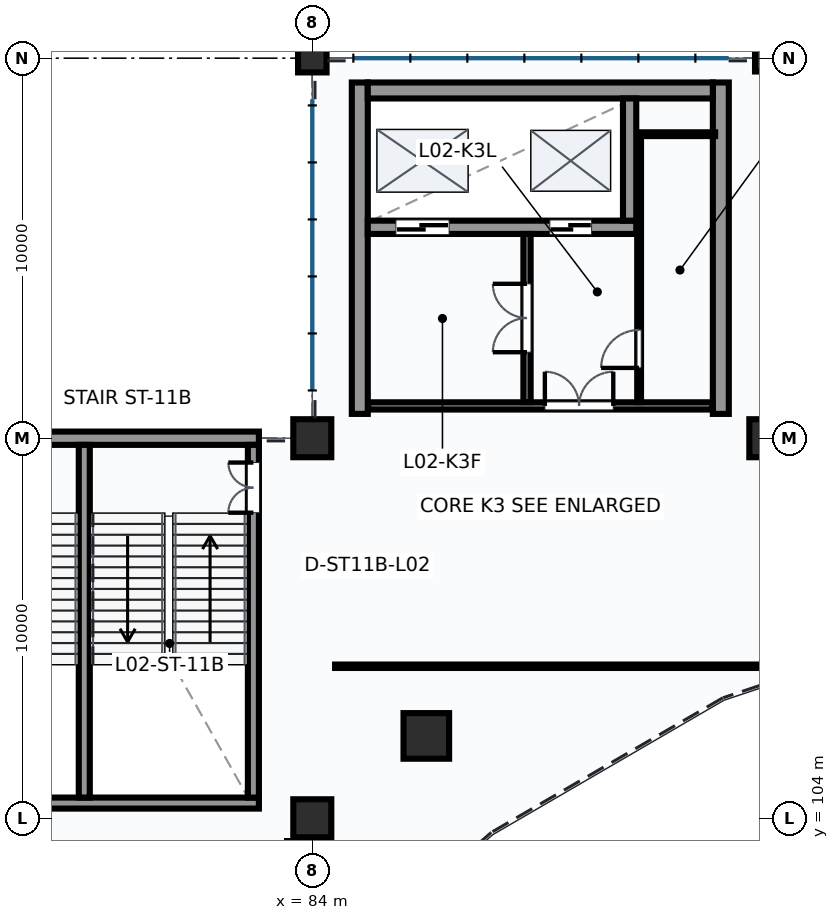
"""IFC4 building model, lengths in metres.
Left out: names, types, materials, properties, quantities, classifications, styles, units other than length and angle.
Written with IfcOpenShell. Run it as: python <this file> out.ifc"""

import sys

from ifc_helpers import new_model, si_unit, direction, frame, frame_2d, origin, origin_2d, place, context, subcontext, project, spatial, rectangle, extrude, element, fill, save


model = new_model("IFC4")
c1 = context("Model", 3, precision=1e-05, world=origin(), true_north=direction((0.0, 1.0)))
c2 = subcontext(c1, "Body", "Model", "MODEL_VIEW")
j1 = project(units=[si_unit("LENGTHUNIT", "METRE"), si_unit("PLANEANGLEUNIT", "RADIAN")], contexts=[c1])
p1 = place(None, origin())
s1 = spatial("IfcSite", under=j1, at=p1, CompositionType="ELEMENT")
p2 = place(p1, origin())
s2 = spatial("IfcBuilding", under=s1, at=p2, CompositionType="ELEMENT")
p3 = place(p2, frame((0.0, 0.0, 10.2)))
s3 = spatial("IfcBuildingStorey", under=s2, at=p3, CompositionType="ELEMENT", Elevation=10.2)
for number, where, z_axis, x_axis in (
    (1, (84.0, 104.0, 0.0), (0.0, 0.0, 1.0), (1.0, 0.0, 0.0)),
    (2, (84.0, 114.0, 0.0), (0.0, 0.0, 1.0), (1.0, 0.0, 0.0)),
):
    element("IfcColumn", number, at=place(p3, frame(where, z_axis=z_axis, x_axis=x_axis)), inside=s3, PredefinedType="COLUMN", context=c2, shape_type="SweptSolid", body=[
        extrude(rectangle(XDim=1.0, YDim=1.0, at=origin_2d()), origin(), (0.0, 0.0, 1.0), 4.5),
    ])
p4 = place(p3, frame((84.0, 124.0, 0.0), z_axis=(0.0, 0.0, 1.0), x_axis=(1.0, 0.0, 0.0)))
e3 = element("IfcColumn", 3, at=p4, inside=s3, PredefinedType="COLUMN", context=c2, shape_type="SweptSolid", body=[
    extrude(rectangle(XDim=0.75, YDim=0.75, at=origin_2d()), origin(), (0.0, 0.0, 1.0), 4.5),
])
p5 = place(p3, frame((96.0, 114.0, 0.0), z_axis=(0.0, 0.0, 1.0), x_axis=(1.0, 0.0, 0.0)))
e4 = element("IfcColumn", 4, at=p5, inside=s3, PredefinedType="COLUMN", context=c2, shape_type="SweptSolid", body=[
    extrude(rectangle(XDim=1.0, YDim=1.0, at=origin_2d()), origin(), (0.0, 0.0, 1.0), 4.5),
])
p6 = place(p3, frame((96.0, 124.0, 0.0), z_axis=(0.0, 0.0, 1.0), x_axis=(1.0, 0.0, 0.0)))
e5 = element("IfcColumn", 5, at=p6, inside=s3, PredefinedType="COLUMN", context=c2, shape_type="SweptSolid", body=[
    extrude(rectangle(XDim=0.7, YDim=0.7, at=origin_2d()), origin(), (0.0, 0.0, 1.0), 4.5),
])
p7 = place(p3, frame((87.0, 106.167, 0.0), z_axis=(0.0, 0.0, 1.0), x_axis=(1.0, 0.0, 0.0)))
e6 = element("IfcColumn", 6, at=p7, inside=s3, PredefinedType="COLUMN", context=c2, shape_type="SweptSolid", body=[
    extrude(rectangle(XDim=1.2, YDim=1.2, at=origin_2d()), origin(), (0.0, 0.0, 1.0), 4.5),
])
p8 = place(p3, frame((73.405, 104.4, 0.0), z_axis=(0.0, 0.0, 1.0), x_axis=(1.0, 0.0, 0.0)))
e7 = element("IfcWall", 7, at=p8, inside=s3, PredefinedType="SHEAR", context=c2, shape_type="SweptSolid", body=[
    extrude(rectangle(XDim=9.19, YDim=0.29, at=frame_2d((4.595, 0.0))), origin(), (0.0, 0.0, 1.0), 4.5),
])
p9 = place(p3, frame((73.405, 114.0, 0.0), z_axis=(0.0, 0.0, 1.0), x_axis=(1.0, 0.0, 0.0)))
e8 = element("IfcWall", 8, at=p9, inside=s3, PredefinedType="SHEAR", context=c2, shape_type="SweptSolid", body=[
    extrude(rectangle(XDim=9.19, YDim=0.35, at=frame_2d((4.595, 0.0))), origin(), (0.0, 0.0, 1.0), 3.664),
])
p10 = place(p3, frame((82.45, 104.545, 0.0), z_axis=(0.0, 0.0, 1.0), x_axis=(0.0, 1.0, 0.0)))
e9 = element("IfcWall", 9, at=p10, inside=s3, PredefinedType="SHEAR", context=c2, shape_type="SweptSolid", body=[
    extrude(rectangle(XDim=9.28, YDim=0.29, at=frame_2d((4.64, 0.0))), origin(), (0.0, 0.0, 1.0), 4.5),
])
p11 = place(p10, frame((7.495, 0.0, 0.0)))
e10 = element("IfcOpeningElement", 10, at=p11, cuts=e9, PredefinedType="OPENING", context=c2, shape_type="SweptSolid", body=[
    extrude(rectangle(XDim=1.32, YDim=2.2, at=frame_2d((0.66, 1.1))), frame((0.0, 0.155, 0.0), z_axis=(0.0, -1.0, 0.0), x_axis=(1.0, 0.0, 0.0)), (0.0, 0.0, 1.0), 0.31),
])
p12 = place(p3, frame((78.0, 104.545, 0.0), z_axis=(0.0, 0.0, 1.0), x_axis=(0.0, 1.0, 0.0)))
e11 = element("IfcWall", 11, at=p12, inside=s3, PredefinedType="SHEAR", context=c2, shape_type="SweptSolid", body=[
    extrude(rectangle(XDim=9.28, YDim=0.29, at=frame_2d((4.64, 0.0))), origin(), (0.0, 0.0, 1.0), 4.5),
])
for number, where, z_axis, x_axis in (
    (12, (85.25, 114.64, 0.0), (0.0, 0.0, 1.0), (0.0, 1.0, 0.0)),
    (13, (94.75, 114.64, 0.0), (0.0, 0.0, 1.0), (0.0, 1.0, 0.0)),
):
    element("IfcWall", number, at=place(p3, frame(where, z_axis=z_axis, x_axis=x_axis)), inside=s3, PredefinedType="SHEAR", context=c2, shape_type="SweptSolid", body=[
        extrude(rectangle(XDim=8.72, YDim=0.42, at=frame_2d((4.36, 0.0))), origin(), (0.0, 0.0, 1.0), 4.5),
    ])
p13 = place(p3, frame((85.46, 123.15, 0.0), z_axis=(0.0, 0.0, 1.0), x_axis=(1.0, 0.0, 0.0)))
e14 = element("IfcWall", 14, at=p13, inside=s3, PredefinedType="SHEAR", context=c2, shape_type="SweptSolid", body=[
    extrude(rectangle(XDim=9.08, YDim=0.42, at=frame_2d((4.54, 0.0))), origin(), (0.0, 0.0, 1.0), 4.5),
])
p14 = place(p3, frame((85.46, 119.55, 0.0), z_axis=(0.0, 0.0, 1.0), x_axis=(1.0, 0.0, 0.0)))
e15 = element("IfcWall", 15, at=p14, inside=s3, PredefinedType="SHEAR", context=c2, shape_type="SweptSolid", body=[
    extrude(rectangle(XDim=7.065, YDim=0.35, at=frame_2d((3.532, 0.0))), origin(), (0.0, 0.0, 1.0), 4.5),
])
p15 = place(p14, frame((0.74, 0.0, 0.0)))
e16 = element("IfcOpeningElement", 16, at=p15, cuts=e15, PredefinedType="OPENING", context=c2, shape_type="SweptSolid", body=[
    extrude(rectangle(XDim=1.4, YDim=2.3, at=frame_2d((0.7, 1.15))), frame((0.0, 0.185, 0.0), z_axis=(0.0, -1.0, 0.0), x_axis=(1.0, 0.0, 0.0)), (0.0, 0.0, 1.0), 0.37),
])
p16 = place(p14, frame((4.79, 0.0, 0.0)))
e17 = element("IfcOpeningElement", 17, at=p16, cuts=e15, PredefinedType="OPENING", context=c2, shape_type="SweptSolid", body=[
    extrude(rectangle(XDim=1.1, YDim=2.2, at=frame_2d((0.55, 1.1))), frame((0.0, 0.185, 0.0), z_axis=(0.0, -1.0, 0.0), x_axis=(1.0, 0.0, 0.0)), (0.0, 0.0, 1.0), 0.37),
])
p17 = place(p3, frame((92.35, 119.725, 0.0), z_axis=(0.0, 0.0, 1.0), x_axis=(0.0, 1.0, 0.0)))
e18 = element("IfcWall", 18, at=p17, inside=s3, PredefinedType="SHEAR", context=c2, shape_type="SweptSolid", body=[
    extrude(rectangle(XDim=3.215, YDim=0.35, at=frame_2d((1.607, 0.0))), origin(), (0.0, 0.0, 1.0), 4.5),
])
p18 = place(p3, frame((85.47, 114.85, 0.0), z_axis=(0.0, 0.0, 1.0), x_axis=(1.0, 0.0, 0.0)))
e19 = element("IfcWall", 19, at=p18, inside=s3, PredefinedType="PARTITIONING", context=c2, shape_type="SweptSolid", body=[
    extrude(rectangle(XDim=9.06, YDim=0.19, at=frame_2d((4.53, 0.0))), origin(), (0.0, 0.0, 1.0), 4.15),
])
p19 = place(p18, frame((4.65, 0.0, 0.0)))
e20 = element("IfcOpeningElement", 20, at=p19, cuts=e19, PredefinedType="OPENING", context=c2, shape_type="SweptSolid", body=[
    extrude(rectangle(XDim=1.8, YDim=2.3, at=frame_2d((0.9, 1.15))), frame((0.0, 0.105, 0.0), z_axis=(0.0, -1.0, 0.0), x_axis=(1.0, 0.0, 0.0)), (0.0, 0.0, 1.0), 0.21),
])
p20 = place(p3, frame((89.65, 114.95, 0.0), z_axis=(0.0, 0.0, 1.0), x_axis=(0.0, 1.0, 0.0)))
e21 = element("IfcWall", 21, at=p20, inside=s3, PredefinedType="PARTITIONING", context=c2, shape_type="SweptSolid", body=[
    extrude(rectangle(XDim=4.425, YDim=0.19, at=frame_2d((2.212, 0.0))), origin(), (0.0, 0.0, 1.0), 4.15),
])
p21 = place(p20, frame((1.313, 0.0, 0.0)))
e22 = element("IfcOpeningElement", 22, at=p21, cuts=e21, PredefinedType="OPENING", context=c2, shape_type="SweptSolid", body=[
    extrude(rectangle(XDim=1.8, YDim=2.2, at=frame_2d((0.9, 1.1))), frame((0.0, 0.105, 0.0), z_axis=(0.0, -1.0, 0.0), x_axis=(1.0, 0.0, 0.0)), (0.0, 0.0, 1.0), 0.21),
])
p22 = place(p3, frame((92.6, 114.95, 0.0), z_axis=(0.0, 0.0, 1.0), x_axis=(0.0, 1.0, 0.0)))
e23 = element("IfcWall", 23, at=p22, inside=s3, PredefinedType="PARTITIONING", context=c2, shape_type="SweptSolid", body=[
    extrude(rectangle(XDim=7.05, YDim=0.1, at=frame_2d((3.525, 0.0))), origin(), (0.0, 0.0, 1.0), 4.15),
])
p23 = place(p22, frame((0.9, 0.0, 0.0)))
e24 = element("IfcOpeningElement", 24, at=p23, cuts=e23, PredefinedType="OPENING", context=c2, shape_type="SweptSolid", body=[
    extrude(rectangle(XDim=1.0, YDim=2.1, at=frame_2d((0.5, 1.05))), frame((0.0, 0.06, 0.0), z_axis=(0.0, -1.0, 0.0), x_axis=(1.0, 0.0, 0.0)), (0.0, 0.0, 1.0), 0.12),
])
p24 = place(p3, frame((92.6, 122.0, 0.0), z_axis=(0.0, 0.0, 1.0), x_axis=(1.0, 0.0, 0.0)))
e25 = element("IfcWall", 25, at=p24, inside=s3, PredefinedType="PARTITIONING", context=c2, shape_type="SweptSolid", body=[
    extrude(rectangle(XDim=2.0, YDim=0.1, at=frame_2d((1.0, 0.0))), origin(), (0.0, 0.0, 1.0), 4.15),
])
p25 = place(p3, frame((96.88, 108.0, 0.0), z_axis=(0.0, 0.0, 1.0), x_axis=(-1.0, 0.0, 0.0)))
e26 = element("IfcWall", 26, at=p25, inside=s3, PredefinedType="PARTITIONING", context=c2, shape_type="SweptSolid", body=[
    extrude(rectangle(XDim=12.28, YDim=0.09, at=frame_2d((6.14, 0.0))), origin(), (0.0, 0.0, 1.0), 4.15),
])
p26 = place(p11, origin())
e27 = element("IfcDoor", 27, at=p26, inside=s3, OperationType="DOUBLE_DOOR_SINGLE_SWING", PredefinedType="DOOR", context=c2, shape_type="SweptSolid", body=[
    extrude(rectangle(XDim=1.32, YDim=2.2, at=frame_2d((0.66, 1.1))), frame((0.0, 0.025, 0.0), z_axis=(0.0, -1.0, 0.0), x_axis=(1.0, 0.0, 0.0)), (0.0, 0.0, 1.0), 0.05),
])
fill(e10, e27)
p27 = place(p15, origin())
e28 = element("IfcDoor", 28, at=p27, inside=s3, OperationType="SLIDING_TO_LEFT", PredefinedType="DOOR", context=c2, shape_type="SweptSolid", body=[
    extrude(rectangle(XDim=1.4, YDim=2.3, at=frame_2d((0.7, 1.15))), frame((0.0, 0.025, 0.0), z_axis=(0.0, -1.0, 0.0), x_axis=(1.0, 0.0, 0.0)), (0.0, 0.0, 1.0), 0.05),
])
fill(e16, e28)
p28 = place(p16, origin())
e29 = element("IfcDoor", 29, at=p28, inside=s3, OperationType="SLIDING_TO_LEFT", PredefinedType="DOOR", context=c2, shape_type="SweptSolid", body=[
    extrude(rectangle(XDim=1.1, YDim=2.2, at=frame_2d((0.55, 1.1))), frame((0.0, 0.025, 0.0), z_axis=(0.0, -1.0, 0.0), x_axis=(1.0, 0.0, 0.0)), (0.0, 0.0, 1.0), 0.05),
])
fill(e17, e29)
p29 = place(p19, origin())
e30 = element("IfcDoor", 30, at=p29, inside=s3, OperationType="DOUBLE_DOOR_SINGLE_SWING", PredefinedType="DOOR", context=c2, shape_type="SweptSolid", body=[
    extrude(rectangle(XDim=1.8, YDim=2.3, at=frame_2d((0.9, 1.15))), frame((0.0, 0.025, 0.0), z_axis=(0.0, -1.0, 0.0), x_axis=(1.0, 0.0, 0.0)), (0.0, 0.0, 1.0), 0.05),
])
fill(e20, e30)
p30 = place(p21, origin())
e31 = element("IfcDoor", 31, at=p30, inside=s3, OperationType="DOUBLE_DOOR_SINGLE_SWING", PredefinedType="DOOR", context=c2, shape_type="SweptSolid", body=[
    extrude(rectangle(XDim=1.8, YDim=2.2, at=frame_2d((0.9, 1.1))), frame((0.0, 0.025, 0.0), z_axis=(0.0, -1.0, 0.0), x_axis=(1.0, 0.0, 0.0)), (0.0, 0.0, 1.0), 0.05),
])
fill(e22, e31)
p31 = place(p23, origin())
e32 = element("IfcDoor", 32, at=p31, inside=s3, OperationType="SINGLE_SWING_LEFT", PredefinedType="DOOR", context=c2, shape_type="SweptSolid", body=[
    extrude(rectangle(XDim=1.0, YDim=2.1, at=frame_2d((0.5, 1.05))), frame((0.0, 0.025, 0.0), z_axis=(0.0, -1.0, 0.0), x_axis=(1.0, 0.0, 0.0)), (0.0, 0.0, 1.0), 0.05),
])
fill(e24, e32)
save(model, sys.argv[1])
